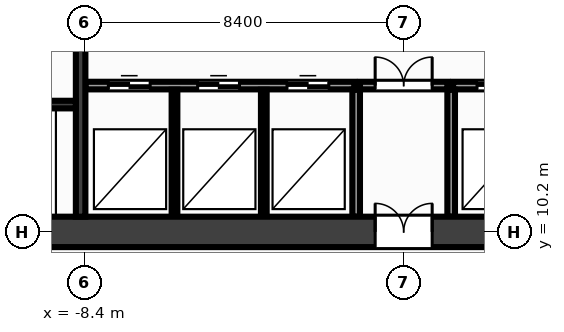
"""IFC4 building model, lengths in metres.
Left out: names, types, materials, properties, quantities, classifications, styles, units other than length and angle.
Written with IfcOpenShell. Run it as: python <this file> out.ifc"""

import sys

from ifc_helpers import new_model, si_unit, direction, frame, frame_2d, origin, place, context, subcontext, project, spatial, rectangle, extrude, source, transform, mapped, element, fill, save


model = new_model("IFC4")
c1 = context("Model", 3, precision=1e-05, world=origin(), true_north=direction((0.0, 1.0)))
c2 = subcontext(c1, "Body", "Model", "MODEL_VIEW")
j1 = project(units=[si_unit("LENGTHUNIT", "METRE"), si_unit("PLANEANGLEUNIT", "RADIAN")], contexts=[c1])
p1 = place(None, origin())
s1 = spatial("IfcSite", under=j1, at=p1, CompositionType="ELEMENT")
p2 = place(p1, origin())
s2 = spatial("IfcBuilding", under=s1, at=p2, CompositionType="ELEMENT")
p3 = place(p2, origin())
s3 = spatial("IfcBuildingStorey", under=s2, at=p3, CompositionType="ELEMENT", Elevation=0.0)
m1 = source(origin(), c2, "Body", "SweptSolid", [
    extrude(rectangle(XDim=32.0, YDim=0.8, at=frame_2d((16.0, 0.0))), origin(), (0.0, 0.0, 1.0), 5.0),
])
p4 = place(p3, frame((-16.0, 10.2, 0.0), z_axis=(0.0, 0.0, 1.0), x_axis=(1.0, 0.0, 0.0)))
e1 = element("IfcWall", 1, at=p4, inside=s3, PredefinedType="SHEAR", context=c2, shape_type="MappedRepresentation", body=[
    mapped(m1, transform((0.0, 0.0, 0.0), x_axis=(1.0, 0.0, 0.0), y_axis=(0.0, 1.0, 0.0), z_axis=(0.0, 0.0, 1.0), scale=1.0)),
])
p5 = place(p4, frame((28.55, 0.0, 0.0)))
e2 = element("IfcOpeningElement", 2, at=p5, cuts=e1, PredefinedType="OPENING", context=c2, shape_type="SweptSolid", body=[
    extrude(rectangle(XDim=1.6, YDim=2.15, at=frame_2d((0.8, 1.075))), frame((0.0, 0.412, 0.0), z_axis=(0.0, -1.0, 0.0), x_axis=(1.0, 0.0, 0.0)), (0.0, 0.0, 1.0), 0.824),
])
p6 = place(p4, frame((15.25, 0.0, 0.0)))
e3 = element("IfcOpeningElement", 3, at=p6, cuts=e1, PredefinedType="OPENING", context=c2, shape_type="SweptSolid", body=[
    extrude(rectangle(XDim=1.5, YDim=2.2, at=frame_2d((0.75, 1.1))), frame((0.0, 0.412, 0.0), z_axis=(0.0, -1.0, 0.0), x_axis=(1.0, 0.0, 0.0)), (0.0, 0.0, 1.0), 0.824),
])
m2 = source(origin(), c2, "Body", "SweptSolid", [
    extrude(rectangle(XDim=12.8, YDim=0.25, at=frame_2d((6.4, 0.0))), origin(), (0.0, 0.0, 1.0), 5.0),
])
p7 = place(p3, frame((-8.5, 10.6, 0.0), z_axis=(0.0, 0.0, 1.0), x_axis=(0.0, 1.0, 0.0)))
e4 = element("IfcWall", 4, at=p7, inside=s3, PredefinedType="SHEAR", context=c2, shape_type="MappedRepresentation", body=[
    mapped(m2, transform((0.0, 0.0, 0.0), x_axis=(1.0, 0.0, 0.0), y_axis=(0.0, 1.0, 0.0), z_axis=(0.0, 0.0, 1.0), scale=1.0)),
])
p8 = place(p7, frame((5.0, 0.0, 0.0)))
e5 = element("IfcOpeningElement", 5, at=p8, cuts=e4, PredefinedType="OPENING", context=c2, shape_type="SweptSolid", body=[
    extrude(rectangle(XDim=0.95, YDim=2.15, at=frame_2d((0.475, 1.075))), frame((0.0, 0.137, 0.0), z_axis=(0.0, -1.0, 0.0), x_axis=(1.0, 0.0, 0.0)), (0.0, 0.0, 1.0), 0.274),
])
p9 = place(p7, frame((8.1, 0.0, 0.0)))
e6 = element("IfcOpeningElement", 6, at=p9, cuts=e4, PredefinedType="OPENING", context=c2, shape_type="SweptSolid", body=[
    extrude(rectangle(XDim=0.95, YDim=2.15, at=frame_2d((0.475, 1.075))), frame((0.0, 0.137, 0.0), z_axis=(0.0, -1.0, 0.0), x_axis=(1.0, 0.0, 0.0)), (0.0, 0.0, 1.0), 0.274),
])
m3 = source(origin(), c2, "Body", "SweptSolid", [
    extrude(rectangle(XDim=2.825, YDim=0.2, at=frame_2d((1.413, 0.0))), origin(), (0.0, 0.0, 1.0), 5.0),
])
p10 = place(p3, frame((-11.45, 13.55, 0.0), z_axis=(0.0, 0.0, 1.0), x_axis=(1.0, 0.0, 0.0)))
e7 = element("IfcWall", 7, at=p10, inside=s3, PredefinedType="SHEAR", context=c2, shape_type="MappedRepresentation", body=[
    mapped(m3, transform((0.0, 0.0, 0.0), x_axis=(1.0, 0.0, 0.0), y_axis=(0.0, 1.0, 0.0), z_axis=(0.0, 0.0, 1.0), scale=1.0)),
])
m4 = source(origin(), c2, "Body", "SweptSolid", [
    extrude(rectangle(XDim=7.07, YDim=0.2, at=frame_2d((3.535, 0.0))), origin(), (0.0, 0.0, 1.0), 4.72),
])
p11 = place(p3, frame((-8.37, 14.05, 0.0), z_axis=(0.0, 0.0, 1.0), x_axis=(1.0, 0.0, 0.0)))
e8 = element("IfcWall", 8, at=p11, inside=s3, PredefinedType="PARTITIONING", context=c2, shape_type="MappedRepresentation", body=[
    mapped(m4, transform((0.0, 0.0, 0.0), x_axis=(1.0, 0.0, 0.0), y_axis=(0.0, 1.0, 0.0), z_axis=(0.0, 0.0, 1.0), scale=1.0)),
])
p12 = place(p11, frame((0.6, 0.0, 0.0)))
e9 = element("IfcOpeningElement", 9, at=p12, cuts=e8, PredefinedType="OPENING", context=c2, shape_type="SweptSolid", body=[
    extrude(rectangle(XDim=1.1, YDim=2.15, at=frame_2d((0.55, 1.075))), frame((0.0, 0.112, 0.0), z_axis=(0.0, -1.0, 0.0), x_axis=(1.0, 0.0, 0.0)), (0.0, 0.0, 1.0), 0.224),
])
p13 = place(p11, frame((2.95, 0.0, 0.0)))
e10 = element("IfcOpeningElement", 10, at=p13, cuts=e8, PredefinedType="OPENING", context=c2, shape_type="SweptSolid", body=[
    extrude(rectangle(XDim=1.1, YDim=2.15, at=frame_2d((0.55, 1.075))), frame((0.0, 0.112, 0.0), z_axis=(0.0, -1.0, 0.0), x_axis=(1.0, 0.0, 0.0)), (0.0, 0.0, 1.0), 0.224),
])
p14 = place(p11, frame((5.3, 0.0, 0.0)))
e11 = element("IfcOpeningElement", 11, at=p14, cuts=e8, PredefinedType="OPENING", context=c2, shape_type="SweptSolid", body=[
    extrude(rectangle(XDim=1.1, YDim=2.15, at=frame_2d((0.55, 1.075))), frame((0.0, 0.112, 0.0), z_axis=(0.0, -1.0, 0.0), x_axis=(1.0, 0.0, 0.0)), (0.0, 0.0, 1.0), 0.224),
])
p15 = place(p3, frame((1.3, 14.05, 0.0), z_axis=(0.0, 0.0, 1.0), x_axis=(1.0, 0.0, 0.0)))
e12 = element("IfcWall", 12, at=p15, inside=s3, PredefinedType="PARTITIONING", context=c2, shape_type="MappedRepresentation", body=[
    mapped(m4, transform((0.0, 0.0, 0.0), x_axis=(1.0, 0.0, 0.0), y_axis=(0.0, 1.0, 0.0), z_axis=(0.0, 0.0, 1.0), scale=1.0)),
])
p16 = place(p15, frame((0.63, 0.0, 0.0)))
e13 = element("IfcOpeningElement", 13, at=p16, cuts=e12, PredefinedType="OPENING", context=c2, shape_type="SweptSolid", body=[
    extrude(rectangle(XDim=1.1, YDim=2.15, at=frame_2d((0.55, 1.075))), frame((0.0, 0.112, 0.0), z_axis=(0.0, -1.0, 0.0), x_axis=(1.0, 0.0, 0.0)), (0.0, 0.0, 1.0), 0.224),
])
p17 = place(p15, frame((2.98, 0.0, 0.0)))
e14 = element("IfcOpeningElement", 14, at=p17, cuts=e12, PredefinedType="OPENING", context=c2, shape_type="SweptSolid", body=[
    extrude(rectangle(XDim=1.1, YDim=2.15, at=frame_2d((0.55, 1.075))), frame((0.0, 0.112, 0.0), z_axis=(0.0, -1.0, 0.0), x_axis=(1.0, 0.0, 0.0)), (0.0, 0.0, 1.0), 0.224),
])
p18 = place(p15, frame((5.33, 0.0, 0.0)))
e15 = element("IfcOpeningElement", 15, at=p18, cuts=e12, PredefinedType="OPENING", context=c2, shape_type="SweptSolid", body=[
    extrude(rectangle(XDim=1.1, YDim=2.15, at=frame_2d((0.55, 1.075))), frame((0.0, 0.112, 0.0), z_axis=(0.0, -1.0, 0.0), x_axis=(1.0, 0.0, 0.0)), (0.0, 0.0, 1.0), 0.224),
])
m5 = source(origin(), c2, "Body", "SweptSolid", [
    extrude(rectangle(XDim=3.34, YDim=0.2, at=frame_2d((1.67, 0.0))), origin(), (0.0, 0.0, 1.0), 4.72),
])
for number, where, z_axis, x_axis in (
    (16, (-1.25, 10.6, 0.0), (0.0, 0.0, 1.0), (0.0, 1.0, 0.0)),
    (17, (1.25, 10.6, 0.0), (0.0, 0.0, 1.0), (0.0, 1.0, 0.0)),
):
    element("IfcWall", number, at=place(p3, frame(where, z_axis=z_axis, x_axis=x_axis)), inside=s3, PredefinedType="PARTITIONING", context=c2, shape_type="MappedRepresentation", body=[
        mapped(m5, transform((0.0, 0.0, 0.0), x_axis=(1.0, 0.0, 0.0), y_axis=(0.0, 1.0, 0.0), z_axis=(0.0, 0.0, 1.0), scale=1.0)),
    ])
m6 = source(origin(), c2, "Body", "SweptSolid", [
    extrude(rectangle(XDim=2.3, YDim=0.2, at=frame_2d((1.15, 0.0))), origin(), (0.0, 0.0, 1.0), 4.72),
])
p19 = place(p3, frame((-1.15, 14.05, 0.0), z_axis=(0.0, 0.0, 1.0), x_axis=(1.0, 0.0, 0.0)))
e18 = element("IfcWall", 18, at=p19, inside=s3, PredefinedType="PARTITIONING", context=c2, shape_type="MappedRepresentation", body=[
    mapped(m6, transform((0.0, 0.0, 0.0), x_axis=(1.0, 0.0, 0.0), y_axis=(0.0, 1.0, 0.0), z_axis=(0.0, 0.0, 1.0), scale=1.0)),
])
p20 = place(p19, frame((0.4, 0.0, 0.0)))
e19 = element("IfcOpeningElement", 19, at=p20, cuts=e18, PredefinedType="OPENING", context=c2, shape_type="SweptSolid", body=[
    extrude(rectangle(XDim=1.5, YDim=2.2, at=frame_2d((0.75, 1.1))), frame((0.0, 0.112, 0.0), z_axis=(0.0, -1.0, 0.0), x_axis=(1.0, 0.0, 0.0)), (0.0, 0.0, 1.0), 0.224),
])
m7 = source(origin(), c2, "Body", "SweptSolid", [
    extrude(rectangle(XDim=3.34, YDim=0.15, at=frame_2d((1.67, 0.0))), origin(), (0.0, 0.0, 1.0), 4.72),
])
for number, where, z_axis, x_axis in (
    (20, (-6.03, 10.6, 0.0), (0.0, 0.0, 1.0), (0.0, 1.0, 0.0)),
    (21, (-3.68, 10.6, 0.0), (0.0, 0.0, 1.0), (0.0, 1.0, 0.0)),
):
    element("IfcWall", number, at=place(p3, frame(where, z_axis=z_axis, x_axis=x_axis)), inside=s3, PredefinedType="PARTITIONING", context=c2, shape_type="MappedRepresentation", body=[
        mapped(m7, transform((0.0, 0.0, 0.0), x_axis=(1.0, 0.0, 0.0), y_axis=(0.0, 1.0, 0.0), z_axis=(0.0, 0.0, 1.0), scale=1.0)),
    ])
m8 = source(origin(), c2, "Body", "SweptSolid", [
    extrude(rectangle(XDim=1.1, YDim=2.15, at=frame_2d((0.55, 1.075))), frame((0.0, 0.025, 0.0), z_axis=(0.0, -1.0, 0.0), x_axis=(1.0, 0.0, 0.0)), (0.0, 0.0, 1.0), 0.05),
])
p21 = place(p12, origin())
e22 = element("IfcDoor", 22, at=p21, inside=s3, OperationType="DOUBLE_DOOR_SLIDING", PredefinedType="DOOR", context=c2, shape_type="MappedRepresentation", body=[
    mapped(m8, transform((0.0, 0.0, 0.0), x_axis=(1.0, 0.0, 0.0), y_axis=(0.0, 1.0, 0.0), z_axis=(0.0, 0.0, 1.0), scale=1.0)),
])
fill(e9, e22)
p22 = place(p13, origin())
e23 = element("IfcDoor", 23, at=p22, inside=s3, OperationType="DOUBLE_DOOR_SLIDING", PredefinedType="DOOR", context=c2, shape_type="MappedRepresentation", body=[
    mapped(m8, transform((0.0, 0.0, 0.0), x_axis=(1.0, 0.0, 0.0), y_axis=(0.0, 1.0, 0.0), z_axis=(0.0, 0.0, 1.0), scale=1.0)),
])
fill(e10, e23)
p23 = place(p14, origin())
e24 = element("IfcDoor", 24, at=p23, inside=s3, OperationType="DOUBLE_DOOR_SLIDING", PredefinedType="DOOR", context=c2, shape_type="MappedRepresentation", body=[
    mapped(m8, transform((0.0, 0.0, 0.0), x_axis=(1.0, 0.0, 0.0), y_axis=(0.0, 1.0, 0.0), z_axis=(0.0, 0.0, 1.0), scale=1.0)),
])
fill(e11, e24)
p24 = place(p16, origin())
e25 = element("IfcDoor", 25, at=p24, inside=s3, OperationType="DOUBLE_DOOR_SLIDING", PredefinedType="DOOR", context=c2, shape_type="MappedRepresentation", body=[
    mapped(m8, transform((0.0, 0.0, 0.0), x_axis=(1.0, 0.0, 0.0), y_axis=(0.0, 1.0, 0.0), z_axis=(0.0, 0.0, 1.0), scale=1.0)),
])
fill(e13, e25)
m9 = source(origin(), c2, "Body", "SweptSolid", [
    extrude(rectangle(XDim=1.5, YDim=2.2, at=frame_2d((0.75, 1.1))), frame((0.0, 0.025, 0.0), z_axis=(0.0, -1.0, 0.0), x_axis=(1.0, 0.0, 0.0)), (0.0, 0.0, 1.0), 0.05),
])
p25 = place(p20, origin())
e26 = element("IfcDoor", 26, at=p25, inside=s3, OperationType="DOUBLE_DOOR_SINGLE_SWING", PredefinedType="DOOR", context=c2, shape_type="MappedRepresentation", body=[
    mapped(m9, transform((0.0, 0.0, 0.0), x_axis=(1.0, 0.0, 0.0), y_axis=(0.0, 1.0, 0.0), z_axis=(0.0, 0.0, 1.0), scale=1.0)),
])
fill(e19, e26)
p26 = place(p6, origin())
e27 = element("IfcDoor", 27, at=p26, inside=s3, OperationType="DOUBLE_DOOR_SINGLE_SWING", PredefinedType="DOOR", context=c2, shape_type="MappedRepresentation", body=[
    mapped(m9, transform((0.0, 0.0, 0.0), x_axis=(1.0, 0.0, 0.0), y_axis=(0.0, 1.0, 0.0), z_axis=(0.0, 0.0, 1.0), scale=1.0)),
])
fill(e3, e27)
save(model, sys.argv[1])
